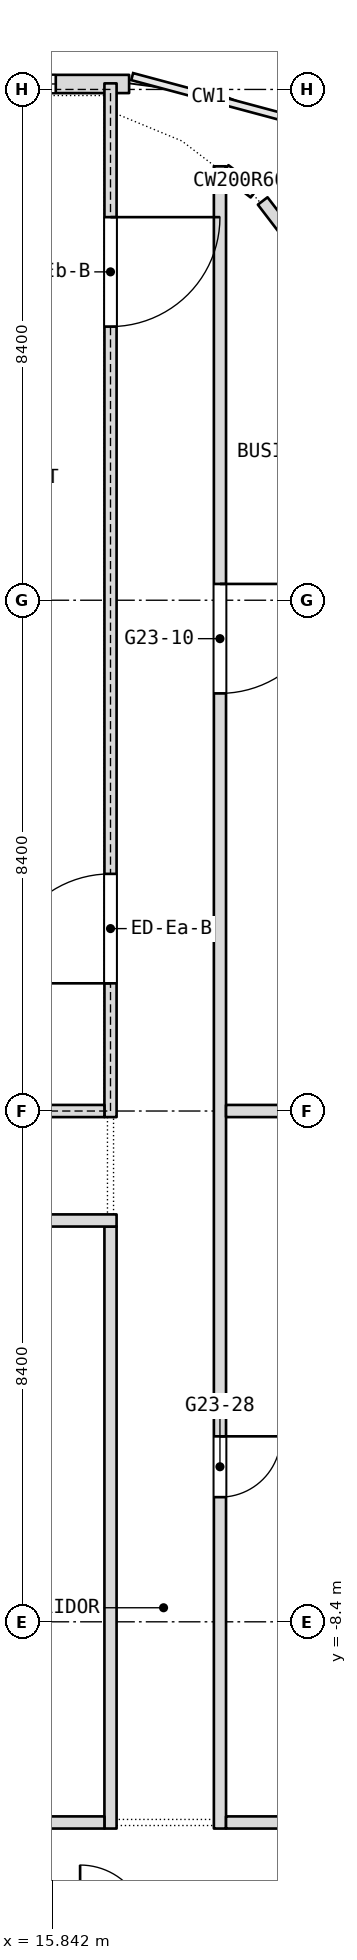
"""IFC4 building model, lengths in metres.
Left out: names, types, materials, properties, quantities, classifications, styles, units other than length and angle.
Written with IfcOpenShell. Run it as: python <this file> out.ifc"""

import sys

from ifc_helpers import new_model, si_unit, direction, frame, frame_2d, origin, place, context, subcontext, project, spatial, rectangle, extrude, element, fill, save


model = new_model("IFC4")
c1 = context("Model", 3, precision=1e-05, world=origin(), true_north=direction((0.0, 1.0)))
c2 = subcontext(c1, "Body", "Model", "MODEL_VIEW")
j1 = project(units=[si_unit("LENGTHUNIT", "METRE"), si_unit("PLANEANGLEUNIT", "RADIAN")], contexts=[c1])
p1 = place(None, origin())
s1 = spatial("IfcSite", under=j1, at=p1, CompositionType="ELEMENT")
p2 = place(p1, origin())
s2 = spatial("IfcBuilding", under=s1, at=p2, CompositionType="ELEMENT")
p3 = place(p2, frame((0.0, 0.0, 270.5)))
s3 = spatial("IfcBuildingStorey", under=s2, at=p3, CompositionType="ELEMENT", Elevation=270.5)
p4 = place(p3, frame((18.6, -11.8, 0.0), z_axis=(0.0, 0.0, 1.0), x_axis=(0.0, 1.0, 0.0)))
e1 = element("IfcWall", 1, at=p4, inside=s3, PredefinedType="PARTITIONING", context=c2, shape_type="SweptSolid", body=[
    extrude(rectangle(XDim=27.336, YDim=0.2, at=frame_2d((13.668, 0.0))), origin(), (0.0, 0.0, 1.0), 3.34),
])
p5 = place(p4, frame((18.668, 0.0, 0.0)))
e2 = element("IfcOpeningElement", 2, at=p5, cuts=e1, PredefinedType="OPENING", context=c2, shape_type="SweptSolid", body=[
    extrude(rectangle(XDim=1.8, YDim=2.1, at=frame_2d((0.9, 1.05))), frame((0.0, 0.1, 0.0), z_axis=(0.0, -1.0, 0.0), x_axis=(1.0, 0.0, 0.0)), (0.0, 0.0, 1.0), 0.2),
])
p6 = place(p4, frame((5.45, 0.0, 0.0)))
e3 = element("IfcOpeningElement", 3, at=p6, cuts=e1, PredefinedType="OPENING", context=c2, shape_type="SweptSolid", body=[
    extrude(rectangle(XDim=1.0, YDim=2.1, at=frame_2d((0.5, 1.05))), frame((0.0, 0.1, 0.0), z_axis=(0.0, -1.0, 0.0), x_axis=(1.0, 0.0, 0.0)), (0.0, 0.0, 1.0), 0.2),
])
p7 = place(p3, frame((16.8, -11.8, 0.0), z_axis=(0.0, 0.0, 1.0), x_axis=(0.0, 1.0, 0.0)))
e4 = element("IfcWall", 4, at=p7, inside=s3, PredefinedType="PARTITIONING", context=c2, shape_type="SweptSolid", body=[
    extrude(rectangle(XDim=9.9, YDim=0.2, at=frame_2d((4.95, 0.0))), origin(), (0.0, 0.0, 1.0), 3.34),
])
p8 = place(p3, frame((-8.3, -11.7, 0.0), z_axis=(0.0, 0.0, 1.0), x_axis=(1.0, 0.0, 0.0)))
e5 = element("IfcWall", 5, at=p8, inside=s3, PredefinedType="PARTITIONING", context=c2, shape_type="SweptSolid", body=[
    extrude(rectangle(XDim=25.0, YDim=0.2, at=frame_2d((12.5, 0.0))), origin(), (0.0, 0.0, 1.0), 3.34),
])
p9 = place(p3, frame((18.7, -11.7, 0.0), z_axis=(0.0, 0.0, 1.0), x_axis=(1.0, 0.0, 0.0)))
e6 = element("IfcWall", 6, at=p9, inside=s3, PredefinedType="PARTITIONING", context=c2, shape_type="SweptSolid", body=[
    extrude(rectangle(XDim=2.3, YDim=0.2, at=frame_2d((1.15, 0.0))), origin(), (0.0, 0.0, 1.0), 3.34),
])
p10 = place(p3, frame((-16.9, -1.8, 0.0), z_axis=(0.0, 0.0, 1.0), x_axis=(1.0, 0.0, 0.0)))
e7 = element("IfcWall", 7, at=p10, inside=s3, PredefinedType="PARTITIONING", context=c2, shape_type="SweptSolid", body=[
    extrude(rectangle(XDim=33.8, YDim=0.2, at=frame_2d((16.9, 0.0))), origin(), (0.0, 0.0, 1.0), 3.34),
])
p11 = place(p10, frame((1.7, 0.0, 0.0)))
e8 = element("IfcOpeningElement", 8, at=p11, cuts=e7, PredefinedType="OPENING", context=c2, shape_type="SweptSolid", body=[
    extrude(rectangle(XDim=1.0, YDim=2.1, at=frame_2d((0.5, 1.05))), frame((0.0, 0.1, 0.0), z_axis=(0.0, -1.0, 0.0), x_axis=(1.0, 0.0, 0.0)), (0.0, 0.0, 1.0), 0.2),
])
p12 = place(p10, frame((5.9, 0.0, 0.0)))
e9 = element("IfcOpeningElement", 9, at=p12, cuts=e7, PredefinedType="OPENING", context=c2, shape_type="SweptSolid", body=[
    extrude(rectangle(XDim=1.0, YDim=2.1, at=frame_2d((0.5, 1.05))), frame((0.0, 0.1, 0.0), z_axis=(0.0, -1.0, 0.0), x_axis=(1.0, 0.0, 0.0)), (0.0, 0.0, 1.0), 0.2),
])
p13 = place(p10, frame((10.1, 0.0, 0.0)))
e10 = element("IfcOpeningElement", 10, at=p13, cuts=e7, PredefinedType="OPENING", context=c2, shape_type="SweptSolid", body=[
    extrude(rectangle(XDim=1.0, YDim=2.1, at=frame_2d((0.5, 1.05))), frame((0.0, 0.1, 0.0), z_axis=(0.0, -1.0, 0.0), x_axis=(1.0, 0.0, 0.0)), (0.0, 0.0, 1.0), 0.2),
])
p14 = place(p10, frame((16.0, 0.0, 0.0)))
e11 = element("IfcOpeningElement", 11, at=p14, cuts=e7, PredefinedType="OPENING", context=c2, shape_type="SweptSolid", body=[
    extrude(rectangle(XDim=1.8, YDim=2.1, at=frame_2d((0.9, 1.05))), frame((0.0, 0.1, 0.0), z_axis=(0.0, -1.0, 0.0), x_axis=(1.0, 0.0, 0.0)), (0.0, 0.0, 1.0), 0.2),
])
p15 = place(p10, frame((22.7, 0.0, 0.0)))
e12 = element("IfcOpeningElement", 12, at=p15, cuts=e7, PredefinedType="OPENING", context=c2, shape_type="SweptSolid", body=[
    extrude(rectangle(XDim=1.0, YDim=2.1, at=frame_2d((0.5, 1.05))), frame((0.0, 0.1, 0.0), z_axis=(0.0, -1.0, 0.0), x_axis=(1.0, 0.0, 0.0)), (0.0, 0.0, 1.0), 0.2),
])
p16 = place(p10, frame((26.9, 0.0, 0.0)))
e13 = element("IfcOpeningElement", 13, at=p16, cuts=e7, PredefinedType="OPENING", context=c2, shape_type="SweptSolid", body=[
    extrude(rectangle(XDim=1.0, YDim=2.1, at=frame_2d((0.5, 1.05))), frame((0.0, 0.1, 0.0), z_axis=(0.0, -1.0, 0.0), x_axis=(1.0, 0.0, 0.0)), (0.0, 0.0, 1.0), 0.2),
])
p17 = place(p10, frame((31.1, 0.0, 0.0)))
e14 = element("IfcOpeningElement", 14, at=p17, cuts=e7, PredefinedType="OPENING", context=c2, shape_type="SweptSolid", body=[
    extrude(rectangle(XDim=1.0, YDim=2.1, at=frame_2d((0.5, 1.05))), frame((0.0, 0.1, 0.0), z_axis=(0.0, -1.0, 0.0), x_axis=(1.0, 0.0, 0.0)), (0.0, 0.0, 1.0), 0.2),
])
p18 = place(p3, frame((18.7, 0.0, 0.0), z_axis=(0.0, 0.0, 1.0), x_axis=(1.0, 0.0, 0.0)))
e15 = element("IfcWall", 15, at=p18, inside=s3, PredefinedType="PARTITIONING", context=c2, shape_type="SweptSolid", body=[
    extrude(rectangle(XDim=2.3, YDim=0.2, at=frame_2d((1.15, 0.0))), origin(), (0.0, 0.0, 1.0), 3.0),
])
p19 = place(p3, frame((18.679, 15.475, 0.0), z_axis=(0.0, 0.0, 1.0), x_axis=(0.794663000987, -0.607050833837, 0.0)))
e16 = element("IfcWall", 16, at=p19, inside=s3, PredefinedType="PARTITIONING", context=c2, shape_type="SweptSolid", body=[
    extrude(rectangle(XDim=0.613, YDim=0.2, at=frame_2d((0.306, 0.0))), origin(), (0.0, 0.0, 1.0), 3.34),
])
p20 = place(p3, frame((19.303, 14.966, 0.0), z_axis=(0.0, 0.0, 1.0), x_axis=(0.607458536541, -0.794351387223, 0.0)))
e17 = element("IfcWall", 17, at=p20, inside=s3, PredefinedType="PARTITIONING", context=c2, shape_type="SweptSolid", body=[
    extrude(rectangle(XDim=1.075, YDim=0.2, at=frame_2d((0.538, 0.0))), origin(), (0.0, 0.0, 1.0), 3.34),
])
p21 = place(p3, frame((17.106, 16.89, 0.0), z_axis=(0.0, 0.0, 1.0), x_axis=(-1.0, 0.0, 0.0)))
e18 = element("IfcWall", 18, at=p21, inside=s3, PredefinedType="NOTDEFINED", context=c2, shape_type="SweptSolid", body=[
    extrude(rectangle(XDim=4.506, YDim=0.3, at=frame_2d((2.253, 0.0))), origin(), (0.0, 0.0, 1.0), 3.6),
])
p22 = place(p21, frame((1.206, 0.0, 0.9)))
e19 = element("IfcOpeningElement", 19, at=p22, cuts=e18, PredefinedType="OPENING", context=c2, shape_type="SweptSolid", body=[
    extrude(rectangle(XDim=2.4, YDim=2.1, at=frame_2d((1.2, 1.05))), frame((0.0, 0.15, 0.0), z_axis=(0.0, -1.0, 0.0), x_axis=(1.0, 0.0, 0.0)), (0.0, 0.0, 1.0), 0.3),
])
p23 = place(p3, frame((16.8, -0.1, 0.0), z_axis=(0.0, 0.0, 1.0), x_axis=(0.0, 1.0, 0.0)))
e20 = element("IfcWall", 20, at=p23, inside=s3, PredefinedType="PARTITIONING", context=c2, shape_type="SweptSolid", body=[
    extrude(rectangle(XDim=17.0, YDim=0.2, at=frame_2d((8.5, 0.0))), origin(), (0.0, 0.0, 1.0), 3.34),
])
p24 = place(p23, frame((2.2, 0.0, 0.0)))
e21 = element("IfcOpeningElement", 21, at=p24, cuts=e20, PredefinedType="OPENING", context=c2, shape_type="SweptSolid", body=[
    extrude(rectangle(XDim=1.8, YDim=2.1, at=frame_2d((0.9, 1.05))), frame((0.0, 0.1, 0.0), z_axis=(0.0, -1.0, 0.0), x_axis=(1.0, 0.0, 0.0)), (0.0, 0.0, 1.0), 0.2),
])
p25 = place(p23, frame((13.0, 0.0, 0.0)))
e22 = element("IfcOpeningElement", 22, at=p25, cuts=e20, PredefinedType="OPENING", context=c2, shape_type="SweptSolid", body=[
    extrude(rectangle(XDim=1.8, YDim=2.1, at=frame_2d((0.9, 1.05))), frame((0.0, 0.1, 0.0), z_axis=(0.0, -1.0, 0.0), x_axis=(1.0, 0.0, 0.0)), (0.0, 0.0, 1.0), 0.2),
])
p26 = place(p3, frame((11.7, 0.0, 0.0), z_axis=(0.0, 0.0, 1.0), x_axis=(1.0, 0.0, 0.0)))
e23 = element("IfcWall", 23, at=p26, inside=s3, PredefinedType="PARTITIONING", context=c2, shape_type="SweptSolid", body=[
    extrude(rectangle(XDim=5.0, YDim=0.2, at=frame_2d((2.5, 0.0))), origin(), (0.0, 0.0, 1.0), 3.0),
])
p27 = place(p5, origin())
e24 = element("IfcDoor", 24, at=p27, inside=s3, OperationType="DOUBLE_DOOR_SINGLE_SWING", PredefinedType="DOOR", context=c2, shape_type="SweptSolid", body=[
    extrude(rectangle(XDim=1.8, YDim=2.1, at=frame_2d((0.9, 1.05))), frame((0.0, 0.025, 0.0), z_axis=(0.0, -1.0, 0.0), x_axis=(1.0, 0.0, 0.0)), (0.0, 0.0, 1.0), 0.05),
])
fill(e2, e24)
p28 = place(p6, origin())
e25 = element("IfcDoor", 25, at=p28, inside=s3, OperationType="SINGLE_SWING_LEFT", PredefinedType="DOOR", context=c2, shape_type="SweptSolid", body=[
    extrude(rectangle(XDim=1.0, YDim=2.1, at=frame_2d((0.5, 1.05))), frame((0.0, 0.025, 0.0), z_axis=(0.0, -1.0, 0.0), x_axis=(1.0, 0.0, 0.0)), (0.0, 0.0, 1.0), 0.05),
])
fill(e3, e25)
p29 = place(p22, origin())
e26 = element("IfcWindow", 26, at=p29, inside=s3, PartitioningType="SINGLE_PANEL", PredefinedType="WINDOW", context=c2, shape_type="SweptSolid", body=[
    extrude(rectangle(XDim=2.4, YDim=2.1, at=frame_2d((1.2, 1.05))), frame((0.0, 0.03, 0.0), z_axis=(0.0, -1.0, 0.0), x_axis=(1.0, 0.0, 0.0)), (0.0, 0.0, 1.0), 0.06),
])
fill(e19, e26)
p30 = place(p24, origin())
e27 = element("IfcDoor", 27, at=p30, inside=s3, OperationType="DOUBLE_DOOR_SINGLE_SWING", PredefinedType="DOOR", context=c2, shape_type="SweptSolid", body=[
    extrude(rectangle(XDim=1.8, YDim=2.1, at=frame_2d((0.9, 1.05))), frame((0.0, 0.025, 0.0), z_axis=(0.0, -1.0, 0.0), x_axis=(1.0, 0.0, 0.0)), (0.0, 0.0, 1.0), 0.05),
])
fill(e21, e27)
p31 = place(p25, origin())
e28 = element("IfcDoor", 28, at=p31, inside=s3, OperationType="DOUBLE_DOOR_SINGLE_SWING", PredefinedType="DOOR", context=c2, shape_type="SweptSolid", body=[
    extrude(rectangle(XDim=1.8, YDim=2.1, at=frame_2d((0.9, 1.05))), frame((0.0, 0.025, 0.0), z_axis=(0.0, -1.0, 0.0), x_axis=(1.0, 0.0, 0.0)), (0.0, 0.0, 1.0), 0.05),
])
fill(e22, e28)
save(model, sys.argv[1])
